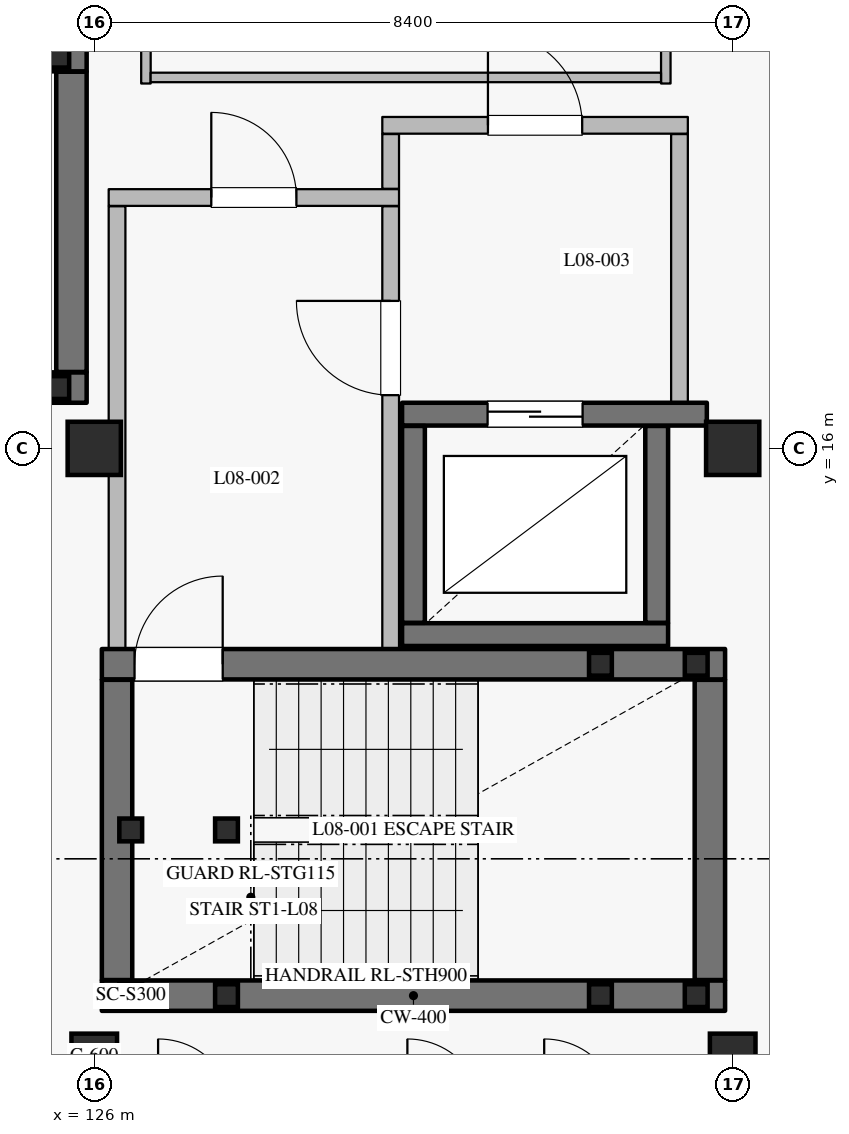
"""IFC4 building model, lengths in metres.
Left out: names, types, materials, properties, quantities, classifications, styles, units other than length and angle.
Written with IfcOpenShell. Run it as: python <this file> out.ifc"""

import sys

from ifc_helpers import new_model, si_unit, direction, frame, frame_2d, origin, origin_2d, place, context, subcontext, project, spatial, rectangle, hollow_rectangle, extrude, element, fill, save


model = new_model("IFC4")
c1 = context("Model", 3, precision=1e-05, world=origin(), true_north=direction((0.0, 1.0)))
c2 = subcontext(c1, "Body", "Model", "MODEL_VIEW")
j1 = project(units=[si_unit("LENGTHUNIT", "METRE"), si_unit("PLANEANGLEUNIT", "RADIAN")], contexts=[c1])
p1 = place(None, origin())
s1 = spatial("IfcSite", under=j1, at=p1, CompositionType="ELEMENT")
p2 = place(p1, origin())
s2 = spatial("IfcBuilding", under=s1, at=p2, CompositionType="ELEMENT")
p3 = place(p2, frame((0.0, 0.0, 36.0)))
s3 = spatial("IfcBuildingStorey", under=s2, at=p3, CompositionType="ELEMENT", Elevation=36.0)
for number, where, z_axis, x_axis in (
    (1, (126.0, 16.0, 0.0), (0.0, 0.0, 1.0), (1.0, 0.0, 0.0)),
    (2, (134.4, 16.0, 0.0), (0.0, 0.0, 1.0), (1.0, 0.0, 0.0)),
):
    element("IfcColumn", number, at=place(p3, frame(where, z_axis=z_axis, x_axis=x_axis)), inside=s3, PredefinedType="COLUMN", context=c2, shape_type="SweptSolid", body=[
        extrude(rectangle(XDim=0.7, YDim=0.7, at=origin_2d()), origin(), (0.0, 0.0, 1.0), 3.6),
    ])
for number, where, z_axis, x_axis in (
    (3, (126.0, 8.0, 0.0), (0.0, 0.0, 1.0), (1.0, 0.0, 0.0)),
    (4, (134.4, 8.0, 0.0), (0.0, 0.0, 1.0), (1.0, 0.0, 0.0)),
):
    element("IfcColumn", number, at=place(p3, frame(where, z_axis=z_axis, x_axis=x_axis)), inside=s3, PredefinedType="COLUMN", context=c2, shape_type="SweptSolid", body=[
        extrude(rectangle(XDim=0.6, YDim=0.6, at=origin_2d()), origin(), (0.0, 0.0, 1.0), 3.6),
    ])
p4 = place(p3, frame((130.05, 13.55, 0.0), z_axis=(0.0, 0.0, 1.0), x_axis=(1.0, 0.0, 0.0)))
e5 = element("IfcWall", 5, at=p4, inside=s3, PredefinedType="SHEAR", context=c2, shape_type="SweptSolid", body=[
    extrude(rectangle(XDim=3.5, YDim=0.3, at=frame_2d((1.75, 0.0))), origin(), (0.0, 0.0, 1.0), 3.365),
])
p5 = place(p3, frame((133.4, 13.705, 0.0), z_axis=(0.0, 0.0, 1.0), x_axis=(0.0, 1.0, 0.0)))
e6 = element("IfcWall", 6, at=p5, inside=s3, PredefinedType="SHEAR", context=c2, shape_type="SweptSolid", body=[
    extrude(rectangle(XDim=2.59, YDim=0.3, at=frame_2d((1.295, 0.0))), origin(), (0.0, 0.0, 1.0), 3.365),
])
p6 = place(p3, frame((134.06, 16.45, 0.0), z_axis=(0.0, 0.0, 1.0), x_axis=(-1.0, 0.0, 0.0)))
e7 = element("IfcWall", 7, at=p6, inside=s3, PredefinedType="SHEAR", context=c2, shape_type="SweptSolid", body=[
    extrude(rectangle(XDim=4.01, YDim=0.3, at=frame_2d((2.005, 0.0))), origin(), (0.0, 0.0, 1.0), 3.365),
])
p7 = place(p6, frame((1.635, 0.0, 0.0)))
e8 = element("IfcOpeningElement", 8, at=p7, cuts=e7, PredefinedType="OPENING", context=c2, shape_type="SweptSolid", body=[
    extrude(rectangle(XDim=1.25, YDim=2.25, at=frame_2d((0.625, 1.125))), frame((0.0, 0.16, 0.0), z_axis=(0.0, -1.0, 0.0), x_axis=(1.0, 0.0, 0.0)), (0.0, 0.0, 1.0), 0.32),
])
p8 = place(p3, frame((130.2, 16.295, 0.0), z_axis=(0.0, 0.0, 1.0), x_axis=(0.0, -1.0, 0.0)))
e9 = element("IfcWall", 9, at=p8, inside=s3, PredefinedType="SHEAR", context=c2, shape_type="SweptSolid", body=[
    extrude(rectangle(XDim=2.59, YDim=0.3, at=frame_2d((1.295, 0.0))), origin(), (0.0, 0.0, 1.0), 3.365),
])
p9 = place(p3, frame((126.1, 8.8, 0.0), z_axis=(0.0, 0.0, 1.0), x_axis=(1.0, 0.0, 0.0)))
e10 = element("IfcWall", 10, at=p9, inside=s3, PredefinedType="SHEAR", context=c2, shape_type="SweptSolid", body=[
    extrude(rectangle(XDim=8.2, YDim=0.4, at=frame_2d((4.1, 0.0))), origin(), (0.0, 0.0, 1.0), 3.365),
])
p10 = place(p3, frame((134.1, 9.005, 0.0), z_axis=(0.0, 0.0, 1.0), x_axis=(0.0, 1.0, 0.0)))
e11 = element("IfcWall", 11, at=p10, inside=s3, PredefinedType="SHEAR", context=c2, shape_type="SweptSolid", body=[
    extrude(rectangle(XDim=3.95, YDim=0.4, at=frame_2d((1.975, 0.0))), origin(), (0.0, 0.0, 1.0), 3.365),
])
p11 = place(p3, frame((126.1, 13.16, 0.0), z_axis=(0.0, 0.0, 1.0), x_axis=(1.0, 0.0, 0.0)))
e12 = element("IfcWall", 12, at=p11, inside=s3, PredefinedType="SHEAR", context=c2, shape_type="SweptSolid", body=[
    extrude(rectangle(XDim=8.2, YDim=0.4, at=frame_2d((4.1, 0.0))), origin(), (0.0, 0.0, 1.0), 3.365),
])
p12 = place(p11, frame((0.43, 0.0, 0.0)))
e13 = element("IfcOpeningElement", 13, at=p12, cuts=e12, PredefinedType="OPENING", context=c2, shape_type="SweptSolid", body=[
    extrude(rectangle(XDim=1.16, YDim=2.2, at=frame_2d((0.58, 1.1))), frame((0.0, 0.21, 0.0), z_axis=(0.0, -1.0, 0.0), x_axis=(1.0, 0.0, 0.0)), (0.0, 0.0, 1.0), 0.42),
])
p13 = place(p3, frame((126.3, 9.005, 0.0), z_axis=(0.0, 0.0, 1.0), x_axis=(0.0, 1.0, 0.0)))
e14 = element("IfcWall", 14, at=p13, inside=s3, PredefinedType="SHEAR", context=c2, shape_type="SweptSolid", body=[
    extrude(rectangle(XDim=3.95, YDim=0.4, at=frame_2d((1.975, 0.0))), origin(), (0.0, 0.0, 1.0), 3.365),
])
p14 = place(p3, frame((126.3, 13.365, 0.0), z_axis=(0.0, 0.0, 1.0), x_axis=(0.0, 1.0, 0.0)))
e15 = element("IfcWall", 15, at=p14, inside=s3, PredefinedType="PARTITIONING", context=c2, shape_type="SweptSolid", body=[
    extrude(rectangle(XDim=5.82, YDim=0.22, at=frame_2d((2.91, 0.0))), origin(), (0.0, 0.0, 1.0), 3.365),
])
p15 = place(p3, frame((126.19, 19.3, 0.0), z_axis=(0.0, 0.0, 1.0), x_axis=(1.0, 0.0, 0.0)))
e16 = element("IfcWall", 16, at=p15, inside=s3, PredefinedType="PARTITIONING", context=c2, shape_type="SweptSolid", body=[
    extrude(rectangle(XDim=3.82, YDim=0.22, at=frame_2d((1.91, 0.0))), origin(), (0.0, 0.0, 1.0), 3.365),
])
p16 = place(p15, frame((1.35, 0.0, 0.0)))
e17 = element("IfcOpeningElement", 17, at=p16, cuts=e16, PredefinedType="OPENING", context=c2, shape_type="SweptSolid", body=[
    extrude(rectangle(XDim=1.12, YDim=2.2, at=frame_2d((0.56, 1.1))), frame((0.0, 0.12, 0.0), z_axis=(0.0, -1.0, 0.0), x_axis=(1.0, 0.0, 0.0)), (0.0, 0.0, 1.0), 0.24),
])
p17 = place(p3, frame((129.9, 13.365, 0.0), z_axis=(0.0, 0.0, 1.0), x_axis=(0.0, 1.0, 0.0)))
e18 = element("IfcWall", 18, at=p17, inside=s3, PredefinedType="PARTITIONING", context=c2, shape_type="SweptSolid", body=[
    extrude(rectangle(XDim=5.82, YDim=0.22, at=frame_2d((2.91, 0.0))), origin(), (0.0, 0.0, 1.0), 3.365),
])
p18 = place(p17, frame((3.335, 0.0, 0.0)))
e19 = element("IfcOpeningElement", 19, at=p18, cuts=e18, PredefinedType="OPENING", context=c2, shape_type="SweptSolid", body=[
    extrude(rectangle(XDim=1.24, YDim=2.2, at=frame_2d((0.62, 1.1))), frame((0.0, 0.12, 0.0), z_axis=(0.0, -1.0, 0.0), x_axis=(1.0, 0.0, 0.0)), (0.0, 0.0, 1.0), 0.24),
])
p19 = place(p3, frame((129.9, 19.415, 0.0), z_axis=(0.0, 0.0, 1.0), x_axis=(0.0, 1.0, 0.0)))
e20 = element("IfcWall", 20, at=p19, inside=s3, PredefinedType="PARTITIONING", context=c2, shape_type="SweptSolid", body=[
    extrude(rectangle(XDim=0.72, YDim=0.22, at=frame_2d((0.36, 0.0))), origin(), (0.0, 0.0, 1.0), 3.365),
])
p20 = place(p3, frame((133.7, 16.605, 0.0), z_axis=(0.0, 0.0, 1.0), x_axis=(0.0, 1.0, 0.0)))
e21 = element("IfcWall", 21, at=p20, inside=s3, PredefinedType="PARTITIONING", context=c2, shape_type="SweptSolid", body=[
    extrude(rectangle(XDim=3.53, YDim=0.22, at=frame_2d((1.765, 0.0))), origin(), (0.0, 0.0, 1.0), 3.365),
])
p21 = place(p3, frame((129.79, 20.25, 0.0), z_axis=(0.0, 0.0, 1.0), x_axis=(1.0, 0.0, 0.0)))
e22 = element("IfcWall", 22, at=p21, inside=s3, PredefinedType="PARTITIONING", context=c2, shape_type="SweptSolid", body=[
    extrude(rectangle(XDim=4.02, YDim=0.22, at=frame_2d((2.01, 0.0))), origin(), (0.0, 0.0, 1.0), 3.365),
])
p22 = place(p21, frame((1.39, 0.0, 0.0)))
e23 = element("IfcOpeningElement", 23, at=p22, cuts=e22, PredefinedType="OPENING", context=c2, shape_type="SweptSolid", body=[
    extrude(rectangle(XDim=1.24, YDim=2.2, at=frame_2d((0.62, 1.1))), frame((0.0, 0.12, 0.0), z_axis=(0.0, -1.0, 0.0), x_axis=(1.0, 0.0, 0.0)), (0.0, 0.0, 1.0), 0.24),
])
for number, where, z_axis, x_axis in (
    (24, (126.48, 8.8, 0.0), (0.0, 0.0, 1.0), (1.0, 0.0, 0.0)),
    (25, (126.48, 10.98, 0.0), (0.0, 0.0, 1.0), (1.0, 0.0, 0.0)),
    (26, (127.74, 8.8, 0.0), (0.0, 0.0, 1.0), (1.0, 0.0, 0.0)),
    (27, (127.74, 10.98, 0.0), (0.0, 0.0, 1.0), (1.0, 0.0, 0.0)),
):
    element("IfcColumn", number, at=place(p3, frame(where, z_axis=z_axis, x_axis=x_axis)), inside=s3, PredefinedType="COLUMN", context=c2, shape_type="SweptSolid", body=[
        extrude(hollow_rectangle(XDim=0.3, YDim=0.3, WallThickness=0.012, at=origin_2d()), origin(), (0.0, 0.0, 1.0), 3.42),
    ])
for number, where, z_axis, x_axis in (
    (28, (132.66, 8.8, -1.8), (0.0, 0.0, 1.0), (1.0, 0.0, 0.0)),
    (29, (132.66, 13.16, -1.8), (0.0, 0.0, 1.0), (1.0, 0.0, 0.0)),
    (30, (133.92, 8.8, -1.8), (0.0, 0.0, 1.0), (1.0, 0.0, 0.0)),
    (31, (133.92, 13.16, -1.8), (0.0, 0.0, 1.0), (1.0, 0.0, 0.0)),
):
    element("IfcColumn", number, at=place(p3, frame(where, z_axis=z_axis, x_axis=x_axis)), inside=s3, PredefinedType="COLUMN", context=c2, shape_type="SweptSolid", body=[
        extrude(hollow_rectangle(XDim=0.3, YDim=0.3, WallThickness=0.012, at=origin_2d()), origin(), (0.0, 0.0, 1.0), 3.42),
    ])
p23 = place(p3, frame((117.75, 16.8, 0.0), z_axis=(0.0, 0.0, 1.0), x_axis=(1.0, 0.0, 0.0)))
e32 = element("IfcWall", 32, at=p23, inside=s3, PredefinedType="SHEAR", context=c2, shape_type="SweptSolid", body=[
    extrude(rectangle(XDim=8.15, YDim=0.4, at=frame_2d((4.075, 0.0))), origin(), (0.0, 0.0, 1.0), 3.365),
])
p24 = place(p3, frame((125.7, 17.005, 0.0), z_axis=(0.0, 0.0, 1.0), x_axis=(0.0, 1.0, 0.0)))
e33 = element("IfcWall", 33, at=p24, inside=s3, PredefinedType="SHEAR", context=c2, shape_type="SweptSolid", body=[
    extrude(rectangle(XDim=3.95, YDim=0.4, at=frame_2d((1.975, 0.0))), origin(), (0.0, 0.0, 1.0), 3.365),
])
p25 = place(p3, frame((117.75, 21.16, 0.0), z_axis=(0.0, 0.0, 1.0), x_axis=(1.0, 0.0, 0.0)))
e34 = element("IfcWall", 34, at=p25, inside=s3, PredefinedType="SHEAR", context=c2, shape_type="SweptSolid", body=[
    extrude(rectangle(XDim=8.15, YDim=0.4, at=frame_2d((4.075, 0.0))), origin(), (0.0, 0.0, 1.0), 3.365),
])
p26 = place(p25, frame((0.38, 0.0, 0.0)))
e35 = element("IfcOpeningElement", 35, at=p26, cuts=e34, PredefinedType="OPENING", context=c2, shape_type="SweptSolid", body=[
    extrude(rectangle(XDim=1.16, YDim=2.2, at=frame_2d((0.58, 1.1))), frame((0.0, 0.21, 0.0), z_axis=(0.0, -1.0, 0.0), x_axis=(1.0, 0.0, 0.0)), (0.0, 0.0, 1.0), 0.42),
])
for number, where, z_axis, x_axis in (
    (36, (125.52, 16.8, -1.8), (0.0, 0.0, 1.0), (1.0, 0.0, 0.0)),
    (37, (125.52, 21.16, -1.8), (0.0, 0.0, 1.0), (1.0, 0.0, 0.0)),
):
    element("IfcColumn", number, at=place(p3, frame(where, z_axis=z_axis, x_axis=x_axis)), inside=s3, PredefinedType="COLUMN", context=c2, shape_type="SweptSolid", body=[
        extrude(hollow_rectangle(XDim=0.3, YDim=0.3, WallThickness=0.012, at=origin_2d()), origin(), (0.0, 0.0, 1.0), 3.42),
    ])
for number, where, z_axis, x_axis in (
    (38, (126.68, 20.8, 0.0), (0.0, 0.0, 1.0), (0.0, 1.0, 0.0)),
    (39, (133.52, 20.8, 0.0), (0.0, 0.0, 1.0), (0.0, 1.0, 0.0)),
):
    element("IfcWall", number, at=place(p3, frame(where, z_axis=z_axis, x_axis=x_axis)), inside=s3, PredefinedType="PARTITIONING", context=c2, shape_type="SweptSolid", body=[
        extrude(rectangle(XDim=2.796, YDim=0.125, at=frame_2d((1.398, 0.0))), origin(), (0.0, 0.0, 1.0), 3.365),
    ])
p27 = place(p3, frame((126.742, 20.88, 0.0), z_axis=(0.0, 0.0, 1.0), x_axis=(1.0, 0.0, 0.0)))
e40 = element("IfcWall", 40, at=p27, inside=s3, PredefinedType="PARTITIONING", context=c2, shape_type="SweptSolid", body=[
    extrude(rectangle(XDim=6.715, YDim=0.125, at=frame_2d((3.357, 0.0))), origin(), (0.0, 0.0, 1.0), 3.365),
])
p28 = place(p7, origin())
e41 = element("IfcDoor", 41, at=p28, inside=s3, OperationType="DOUBLE_DOOR_SLIDING", PredefinedType="DOOR", context=c2, shape_type="SweptSolid", body=[
    extrude(rectangle(XDim=1.25, YDim=2.25, at=frame_2d((0.625, 1.125))), frame((0.0, 0.025, 0.0), z_axis=(0.0, -1.0, 0.0), x_axis=(1.0, 0.0, 0.0)), (0.0, 0.0, 1.0), 0.05),
])
fill(e8, e41)
p29 = place(p12, origin())
e42 = element("IfcDoor", 42, at=p29, inside=s3, OperationType="SINGLE_SWING_RIGHT", PredefinedType="DOOR", context=c2, shape_type="SweptSolid", body=[
    extrude(rectangle(XDim=1.16, YDim=2.2, at=frame_2d((0.58, 1.1))), frame((0.0, 0.025, 0.0), z_axis=(0.0, -1.0, 0.0), x_axis=(1.0, 0.0, 0.0)), (0.0, 0.0, 1.0), 0.05),
])
fill(e13, e42)
p30 = place(p16, origin())
e43 = element("IfcDoor", 43, at=p30, inside=s3, OperationType="SINGLE_SWING_LEFT", PredefinedType="DOOR", context=c2, shape_type="SweptSolid", body=[
    extrude(rectangle(XDim=1.12, YDim=2.2, at=frame_2d((0.56, 1.1))), frame((0.0, 0.025, 0.0), z_axis=(0.0, -1.0, 0.0), x_axis=(1.0, 0.0, 0.0)), (0.0, 0.0, 1.0), 0.05),
])
fill(e17, e43)
p31 = place(p18, origin())
e44 = element("IfcDoor", 44, at=p31, inside=s3, OperationType="SINGLE_SWING_RIGHT", PredefinedType="DOOR", context=c2, shape_type="SweptSolid", body=[
    extrude(rectangle(XDim=1.24, YDim=2.2, at=frame_2d((0.62, 1.1))), frame((0.0, 0.025, 0.0), z_axis=(0.0, -1.0, 0.0), x_axis=(1.0, 0.0, 0.0)), (0.0, 0.0, 1.0), 0.05),
])
fill(e19, e44)
p32 = place(p22, origin())
e45 = element("IfcDoor", 45, at=p32, inside=s3, OperationType="SINGLE_SWING_LEFT", PredefinedType="DOOR", context=c2, shape_type="SweptSolid", body=[
    extrude(rectangle(XDim=1.24, YDim=2.2, at=frame_2d((0.62, 1.1))), frame((0.0, 0.025, 0.0), z_axis=(0.0, -1.0, 0.0), x_axis=(1.0, 0.0, 0.0)), (0.0, 0.0, 1.0), 0.05),
])
fill(e23, e45)
save(model, sys.argv[1])
